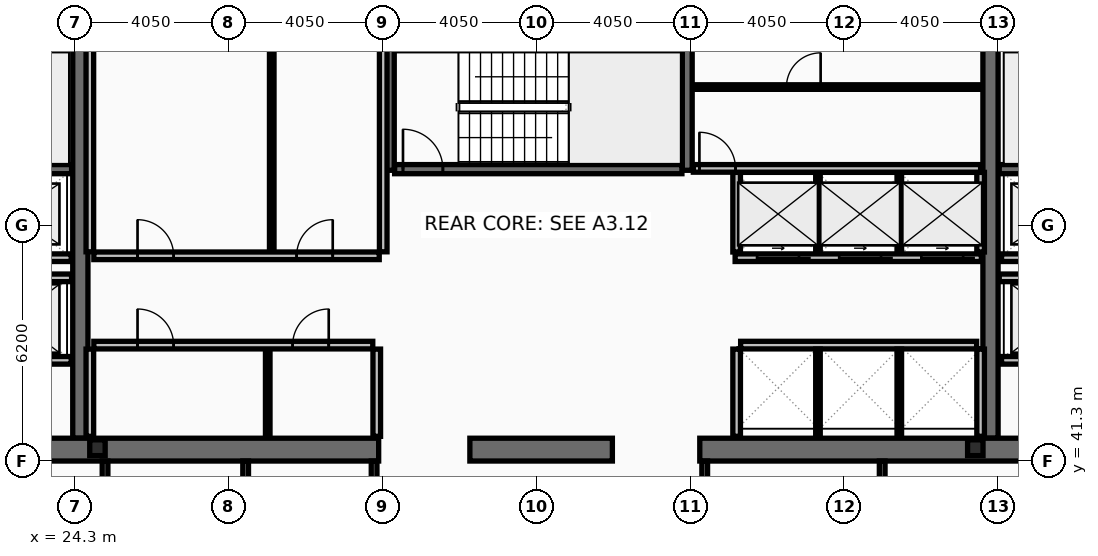
"""IFC4 building model, lengths in metres.
Left out: names, types, materials, properties, quantities, classifications, styles, units other than length and angle.
Written with IfcOpenShell. Run it as: python <this file> out.ifc"""

import sys

from ifc_helpers import new_model, si_unit, direction, frame, frame_2d, origin, origin_2d, place, context, subcontext, project, spatial, rectangle, i_section, extrude, element, fill, save


model = new_model("IFC4")
c1 = context("Model", 3, precision=1e-05, world=origin(), true_north=direction((0.0, 1.0)))
c2 = subcontext(c1, "Body", "Model", "MODEL_VIEW")
j1 = project(units=[si_unit("LENGTHUNIT", "METRE"), si_unit("PLANEANGLEUNIT", "RADIAN")], contexts=[c1])
p1 = place(None, origin())
s1 = spatial("IfcSite", under=j1, at=p1, CompositionType="ELEMENT")
p2 = place(p1, origin())
s2 = spatial("IfcBuilding", under=s1, at=p2, CompositionType="ELEMENT")
p3 = place(p2, frame((0.0, 0.0, 235.4)))
s3 = spatial("IfcBuildingStorey", under=s2, at=p3, CompositionType="ELEMENT", Elevation=235.4)
for number, where, z_axis, x_axis in (
    (1, (24.45, 41.9, 0.0), (0.0, 0.0, 1.0), (0.0, 1.0, 0.0)),
    (2, (48.4, 41.9, 0.0), (0.0, 0.0, 1.0), (0.0, 1.0, 0.0)),
):
    element("IfcWall", number, at=place(p3, frame(where, z_axis=z_axis, x_axis=x_axis)), inside=s3, PredefinedType="SHEAR", context=c2, shape_type="SweptSolid", body=[
        extrude(rectangle(XDim=11.2, YDim=0.4, at=frame_2d((5.6, 0.0))), origin(), (0.0, 0.0, 1.0), 3.44),
    ])
p4 = place(p3, frame((32.3, 41.6, 0.0), z_axis=(0.0, 0.0, 1.0), x_axis=(-1.0, 0.0, 0.0)))
e3 = element("IfcWall", 3, at=p4, inside=s3, PredefinedType="SHEAR", context=c2, shape_type="SweptSolid", body=[
    extrude(rectangle(XDim=11.45, YDim=0.6, at=frame_2d((5.725, 0.0))), origin(), (0.0, 0.0, 1.0), 3.44),
])
p5 = place(p3, frame((38.45, 41.6, 0.0), z_axis=(0.0, 0.0, 1.0), x_axis=(-1.0, 0.0, 0.0)))
e4 = element("IfcWall", 4, at=p5, inside=s3, PredefinedType="SHEAR", context=c2, shape_type="SweptSolid", body=[
    extrude(rectangle(XDim=3.75, YDim=0.6, at=frame_2d((1.875, 0.0))), origin(), (0.0, 0.0, 1.0), 3.44),
])
p6 = place(p3, frame((52.05, 41.6, 0.0), z_axis=(0.0, 0.0, 1.0), x_axis=(-1.0, 0.0, 0.0)))
e5 = element("IfcWall", 5, at=p6, inside=s3, PredefinedType="SHEAR", context=c2, shape_type="SweptSolid", body=[
    extrude(rectangle(XDim=11.3, YDim=0.6, at=frame_2d((5.65, 0.0))), origin(), (0.0, 0.0, 1.0), 3.44),
])
for number, where, z_axis, x_axis in (
    (6, (32.58, 48.95, 0.0), (0.0, 0.0, 1.0), (0.0, 1.0, 0.0)),
    (7, (40.42, 48.95, 0.0), (0.0, 0.0, 1.0), (0.0, 1.0, 0.0)),
):
    element("IfcWall", number, at=place(p3, frame(where, z_axis=z_axis, x_axis=x_axis)), inside=s3, PredefinedType="SHEAR", context=c2, shape_type="SweptSolid", body=[
        extrude(rectangle(XDim=4.15, YDim=0.26, at=frame_2d((2.075, 0.0))), origin(), (0.0, 0.0, 1.0), 3.44),
    ])
p7 = place(p3, frame((16.8, 48.98, 0.0), z_axis=(0.0, 0.0, 1.0), x_axis=(1.0, 0.0, 0.0)))
e8 = element("IfcWall", 8, at=p7, inside=s3, PredefinedType="SHEAR", context=c2, shape_type="SweptSolid", body=[
    extrude(rectangle(XDim=7.42, YDim=0.24, at=frame_2d((3.71, 0.0))), origin(), (0.0, 0.0, 1.0), 3.44),
])
p8 = place(p7, frame((0.22, 0.0, 0.0)))
e9 = element("IfcOpeningElement", 9, at=p8, cuts=e8, PredefinedType="OPENING", context=c2, shape_type="SweptSolid", body=[
    extrude(rectangle(XDim=1.05, YDim=2.15, at=frame_2d((0.525, 1.075))), frame((0.0, 0.13, 0.0), z_axis=(0.0, -1.0, 0.0), x_axis=(1.0, 0.0, 0.0)), (0.0, 0.0, 1.0), 0.26),
])
p9 = place(p3, frame((48.63, 48.98, 0.0), z_axis=(0.0, 0.0, 1.0), x_axis=(1.0, 0.0, 0.0)))
e10 = element("IfcWall", 10, at=p9, inside=s3, PredefinedType="SHEAR", context=c2, shape_type="SweptSolid", body=[
    extrude(rectangle(XDim=7.47, YDim=0.24, at=frame_2d((3.735, 0.0))), origin(), (0.0, 0.0, 1.0), 3.44),
])
p10 = place(p9, frame((6.2, 0.0, 0.0)))
e11 = element("IfcOpeningElement", 11, at=p10, cuts=e10, PredefinedType="OPENING", context=c2, shape_type="SweptSolid", body=[
    extrude(rectangle(XDim=1.05, YDim=2.15, at=frame_2d((0.525, 1.075))), frame((0.0, 0.13, 0.0), z_axis=(0.0, -1.0, 0.0), x_axis=(1.0, 0.0, 0.0)), (0.0, 0.0, 1.0), 0.26),
])
p11 = place(p3, frame((32.72, 48.98, 0.0), z_axis=(0.0, 0.0, 1.0), x_axis=(1.0, 0.0, 0.0)))
e12 = element("IfcWall", 12, at=p11, inside=s3, PredefinedType="SHEAR", context=c2, shape_type="SweptSolid", body=[
    extrude(rectangle(XDim=7.56, YDim=0.24, at=frame_2d((3.78, 0.0))), origin(), (0.0, 0.0, 1.0), 3.44),
])
p12 = place(p11, frame((0.22, 0.0, 0.0)))
e13 = element("IfcOpeningElement", 13, at=p12, cuts=e12, PredefinedType="OPENING", context=c2, shape_type="SweptSolid", body=[
    extrude(rectangle(XDim=1.05, YDim=2.15, at=frame_2d((0.525, 1.075))), frame((0.0, 0.13, 0.0), z_axis=(0.0, -1.0, 0.0), x_axis=(1.0, 0.0, 0.0)), (0.0, 0.0, 1.0), 0.26),
])
for number, where, z_axis, x_axis in (
    (14, (24.9, 41.65, 0.0), (0.0, 0.0, 1.0), (1.0, 0.0, 0.0)),
    (15, (48.0, 41.65, 0.0), (0.0, 0.0, 1.0), (1.0, 0.0, 0.0)),
):
    element("IfcColumn", number, at=place(p3, frame(where, z_axis=z_axis, x_axis=x_axis)), inside=s3, PredefinedType="COLUMN", context=c2, shape_type="SweptSolid", body=[
        extrude(i_section(OverallWidth=0.406, OverallDepth=0.416, WebThickness=0.03, FlangeThickness=0.048, at=origin_2d()), origin(), (0.0, 0.0, 1.0), 3.6),
    ])
p13 = place(p3, frame((51.61, 43.95, 0.0), z_axis=(0.0, 0.0, 1.0), x_axis=(-1.0, 0.0, 0.0)))
e16 = element("IfcWall", 16, at=p13, inside=s3, PredefinedType="PARTITIONING", context=c2, shape_type="SweptSolid", body=[
    extrude(rectangle(XDim=2.92, YDim=0.2, at=frame_2d((1.46, 0.0))), origin(), (0.0, 0.0, 1.0), 3.44),
])
p14 = place(p13, frame((0.81, 0.0, 0.0)))
e17 = element("IfcOpeningElement", 17, at=p14, cuts=e16, PredefinedType="OPENING", context=c2, shape_type="SweptSolid", body=[
    extrude(rectangle(XDim=1.3, YDim=2.18, at=frame_2d((0.65, 1.09))), frame((0.0, 0.11, 0.0), z_axis=(0.0, -1.0, 0.0), x_axis=(1.0, 0.0, 0.0)), (0.0, 0.0, 1.0), 0.22),
])
p15 = place(p3, frame((24.21, 43.95, 0.0), z_axis=(0.0, 0.0, 1.0), x_axis=(-1.0, 0.0, 0.0)))
e18 = element("IfcWall", 18, at=p15, inside=s3, PredefinedType="PARTITIONING", context=c2, shape_type="SweptSolid", body=[
    extrude(rectangle(XDim=2.97, YDim=0.2, at=frame_2d((1.485, 0.0))), origin(), (0.0, 0.0, 1.0), 3.44),
])
p16 = place(p15, frame((0.86, 0.0, 0.0)))
e19 = element("IfcOpeningElement", 19, at=p16, cuts=e18, PredefinedType="OPENING", context=c2, shape_type="SweptSolid", body=[
    extrude(rectangle(XDim=1.3, YDim=2.18, at=frame_2d((0.65, 1.09))), frame((0.0, 0.11, 0.0), z_axis=(0.0, -1.0, 0.0), x_axis=(1.0, 0.0, 0.0)), (0.0, 0.0, 1.0), 0.22),
])
p17 = place(p3, frame((51.61, 46.65, 0.0), z_axis=(0.0, 0.0, 1.0), x_axis=(-1.0, 0.0, 0.0)))
e20 = element("IfcWall", 20, at=p17, inside=s3, PredefinedType="PARTITIONING", context=c2, shape_type="SweptSolid", body=[
    extrude(rectangle(XDim=2.92, YDim=0.2, at=frame_2d((1.46, 0.0))), origin(), (0.0, 0.0, 1.0), 3.44),
])
p18 = place(p17, frame((0.86, 0.0, 0.0)))
e21 = element("IfcOpeningElement", 21, at=p18, cuts=e20, PredefinedType="OPENING", context=c2, shape_type="SweptSolid", body=[
    extrude(rectangle(XDim=1.2, YDim=2.18, at=frame_2d((0.6, 1.09))), frame((0.0, 0.11, 0.0), z_axis=(0.0, -1.0, 0.0), x_axis=(1.0, 0.0, 0.0)), (0.0, 0.0, 1.0), 0.22),
])
p19 = place(p3, frame((24.21, 46.65, 0.0), z_axis=(0.0, 0.0, 1.0), x_axis=(-1.0, 0.0, 0.0)))
e22 = element("IfcWall", 22, at=p19, inside=s3, PredefinedType="PARTITIONING", context=c2, shape_type="SweptSolid", body=[
    extrude(rectangle(XDim=2.97, YDim=0.2, at=frame_2d((1.485, 0.0))), origin(), (0.0, 0.0, 1.0), 3.44),
])
p20 = place(p19, frame((0.91, 0.0, 0.0)))
e23 = element("IfcOpeningElement", 23, at=p20, cuts=e22, PredefinedType="OPENING", context=c2, shape_type="SweptSolid", body=[
    extrude(rectangle(XDim=1.2, YDim=2.18, at=frame_2d((0.6, 1.09))), frame((0.0, 0.11, 0.0), z_axis=(0.0, -1.0, 0.0), x_axis=(1.0, 0.0, 0.0)), (0.0, 0.0, 1.0), 0.22),
])
p21 = place(p3, frame((48.16, 46.65, 0.0), z_axis=(0.0, 0.0, 1.0), x_axis=(-1.0, 0.0, 0.0)))
e24 = element("IfcWall", 24, at=p21, inside=s3, PredefinedType="PARTITIONING", context=c2, shape_type="SweptSolid", body=[
    extrude(rectangle(XDim=6.48, YDim=0.2, at=frame_2d((3.24, 0.0))), origin(), (0.0, 0.0, 1.0), 3.44),
])
p22 = place(p21, frame((4.8, 0.0, 0.0)))
e25 = element("IfcOpeningElement", 25, at=p22, cuts=e24, PredefinedType="OPENING", context=c2, shape_type="SweptSolid", body=[
    extrude(rectangle(XDim=1.1, YDim=2.18, at=frame_2d((0.55, 1.09))), frame((0.0, 0.11, 0.0), z_axis=(0.0, -1.0, 0.0), x_axis=(1.0, 0.0, 0.0)), (0.0, 0.0, 1.0), 0.22),
])
p23 = place(p21, frame((2.64, 0.0, 0.0)))
e26 = element("IfcOpeningElement", 26, at=p23, cuts=e24, PredefinedType="OPENING", context=c2, shape_type="SweptSolid", body=[
    extrude(rectangle(XDim=1.1, YDim=2.18, at=frame_2d((0.55, 1.09))), frame((0.0, 0.11, 0.0), z_axis=(0.0, -1.0, 0.0), x_axis=(1.0, 0.0, 0.0)), (0.0, 0.0, 1.0), 0.22),
])
p24 = place(p21, frame((0.48, 0.0, 0.0)))
e27 = element("IfcOpeningElement", 27, at=p24, cuts=e24, PredefinedType="OPENING", context=c2, shape_type="SweptSolid", body=[
    extrude(rectangle(XDim=1.1, YDim=2.18, at=frame_2d((0.55, 1.09))), frame((0.0, 0.11, 0.0), z_axis=(0.0, -1.0, 0.0), x_axis=(1.0, 0.0, 0.0)), (0.0, 0.0, 1.0), 0.22),
])
p25 = place(p3, frame((21.2, 46.12, 0.0), z_axis=(0.0, 0.0, 1.0), x_axis=(1.0, 0.0, 0.0)))
e28 = element("IfcWall", 28, at=p25, inside=s3, PredefinedType="PARTITIONING", context=c2, shape_type="SweptSolid", body=[
    extrude(rectangle(XDim=3.02, YDim=0.2, at=frame_2d((1.51, 0.0))), origin(), (0.0, 0.0, 1.0), 3.44),
])
p26 = place(p3, frame((48.63, 46.12, 0.0), z_axis=(0.0, 0.0, 1.0), x_axis=(1.0, 0.0, 0.0)))
e29 = element("IfcWall", 29, at=p26, inside=s3, PredefinedType="PARTITIONING", context=c2, shape_type="SweptSolid", body=[
    extrude(rectangle(XDim=3.07, YDim=0.2, at=frame_2d((1.535, 0.0))), origin(), (0.0, 0.0, 1.0), 3.44),
])
for number, where, z_axis, x_axis in (
    (30, (24.7, 46.805, 0.0), (0.0, 0.0, 1.0), (0.0, 1.0, 0.0)),
    (31, (32.42, 46.805, 0.0), (0.0, 0.0, 1.0), (0.0, 1.0, 0.0)),
):
    element("IfcWall", number, at=place(p3, frame(where, z_axis=z_axis, x_axis=x_axis)), inside=s3, PredefinedType="PARTITIONING", context=c2, shape_type="SweptSolid", body=[
        extrude(rectangle(XDim=5.99, YDim=0.2, at=frame_2d((2.995, 0.0))), origin(), (0.0, 0.0, 1.0), 3.44),
    ])
p27 = place(p3, frame((29.486, 46.805, 0.0), z_axis=(0.0, 0.0, 1.0), x_axis=(0.0, 1.0, 0.0)))
e32 = element("IfcWall", 32, at=p27, inside=s3, PredefinedType="PARTITIONING", context=c2, shape_type="SweptSolid", body=[
    extrude(rectangle(XDim=5.99, YDim=0.12, at=frame_2d((2.995, 0.0))), origin(), (0.0, 0.0, 1.0), 3.44),
])
p28 = place(p3, frame((24.805, 46.7, 0.0), z_axis=(0.0, 0.0, 1.0), x_axis=(1.0, 0.0, 0.0)))
e33 = element("IfcWall", 33, at=p28, inside=s3, PredefinedType="PARTITIONING", context=c2, shape_type="SweptSolid", body=[
    extrude(rectangle(XDim=7.51, YDim=0.2, at=frame_2d((3.755, 0.0))), origin(), (0.0, 0.0, 1.0), 3.44),
])
p29 = place(p28, frame((1.15, 0.0, 0.0)))
e34 = element("IfcOpeningElement", 34, at=p29, cuts=e33, PredefinedType="OPENING", context=c2, shape_type="SweptSolid", body=[
    extrude(rectangle(XDim=0.95, YDim=2.1, at=frame_2d((0.475, 1.05))), frame((0.0, 0.11, 0.0), z_axis=(0.0, -1.0, 0.0), x_axis=(1.0, 0.0, 0.0)), (0.0, 0.0, 1.0), 0.22),
])
p30 = place(p28, frame((5.336, 0.0, 0.0)))
e35 = element("IfcOpeningElement", 35, at=p30, cuts=e33, PredefinedType="OPENING", context=c2, shape_type="SweptSolid", body=[
    extrude(rectangle(XDim=0.95, YDim=2.1, at=frame_2d((0.475, 1.05))), frame((0.0, 0.11, 0.0), z_axis=(0.0, -1.0, 0.0), x_axis=(1.0, 0.0, 0.0)), (0.0, 0.0, 1.0), 0.22),
])
for number, where, z_axis, x_axis in (
    (36, (24.7, 41.95, 0.0), (0.0, 0.0, 1.0), (0.0, 1.0, 0.0)),
    (37, (32.25, 41.95, 0.0), (0.0, 0.0, 1.0), (0.0, 1.0, 0.0)),
):
    element("IfcWall", number, at=place(p3, frame(where, z_axis=z_axis, x_axis=x_axis)), inside=s3, PredefinedType="PARTITIONING", context=c2, shape_type="SweptSolid", body=[
        extrude(rectangle(XDim=2.295, YDim=0.2, at=frame_2d((1.147, 0.0))), origin(), (0.0, 0.0, 1.0), 3.44),
    ])
p31 = place(p3, frame((29.381, 41.95, 0.0), z_axis=(0.0, 0.0, 1.0), x_axis=(0.0, 1.0, 0.0)))
e38 = element("IfcWall", 38, at=p31, inside=s3, PredefinedType="PARTITIONING", context=c2, shape_type="SweptSolid", body=[
    extrude(rectangle(XDim=2.295, YDim=0.12, at=frame_2d((1.147, 0.0))), origin(), (0.0, 0.0, 1.0), 3.44),
])
p32 = place(p3, frame((24.805, 44.35, 0.0), z_axis=(0.0, 0.0, 1.0), x_axis=(1.0, 0.0, 0.0)))
e39 = element("IfcWall", 39, at=p32, inside=s3, PredefinedType="PARTITIONING", context=c2, shape_type="SweptSolid", body=[
    extrude(rectangle(XDim=7.34, YDim=0.2, at=frame_2d((3.67, 0.0))), origin(), (0.0, 0.0, 1.0), 3.44),
])
p33 = place(p32, frame((1.15, 0.0, 0.0)))
e40 = element("IfcOpeningElement", 40, at=p33, cuts=e39, PredefinedType="OPENING", context=c2, shape_type="SweptSolid", body=[
    extrude(rectangle(XDim=0.95, YDim=2.1, at=frame_2d((0.475, 1.05))), frame((0.0, 0.11, 0.0), z_axis=(0.0, -1.0, 0.0), x_axis=(1.0, 0.0, 0.0)), (0.0, 0.0, 1.0), 0.22),
])
p34 = place(p32, frame((5.231, 0.0, 0.0)))
e41 = element("IfcOpeningElement", 41, at=p34, cuts=e39, PredefinedType="OPENING", context=c2, shape_type="SweptSolid", body=[
    extrude(rectangle(XDim=0.95, YDim=2.1, at=frame_2d((0.475, 1.05))), frame((0.0, 0.11, 0.0), z_axis=(0.0, -1.0, 0.0), x_axis=(1.0, 0.0, 0.0)), (0.0, 0.0, 1.0), 0.22),
])
for number, where, z_axis, x_axis in (
    (42, (41.72, 46.8, 0.0), (0.0, 0.0, 1.0), (0.0, 1.0, 0.0)),
    (43, (48.14, 46.8, 0.0), (0.0, 0.0, 1.0), (0.0, 1.0, 0.0)),
):
    element("IfcWall", number, at=place(p3, frame(where, z_axis=z_axis, x_axis=x_axis)), inside=s3, PredefinedType="PARTITIONING", context=c2, shape_type="SweptSolid", body=[
        extrude(rectangle(XDim=2.095, YDim=0.2, at=frame_2d((1.047, 0.0))), origin(), (0.0, 0.0, 1.0), 3.44),
    ])
for number, where, z_axis, x_axis in (
    (44, (43.86, 46.8, 0.0), (0.0, 0.0, 1.0), (0.0, 1.0, 0.0)),
    (45, (46.0, 46.8, 0.0), (0.0, 0.0, 1.0), (0.0, 1.0, 0.0)),
):
    element("IfcWall", number, at=place(p3, frame(where, z_axis=z_axis, x_axis=x_axis)), inside=s3, PredefinedType="PARTITIONING", context=c2, shape_type="SweptSolid", body=[
        extrude(rectangle(XDim=2.095, YDim=0.12, at=frame_2d((1.047, 0.0))), origin(), (0.0, 0.0, 1.0), 3.44),
    ])
p35 = place(p3, frame((41.825, 44.35, 0.0), z_axis=(0.0, 0.0, 1.0), x_axis=(1.0, 0.0, 0.0)))
e46 = element("IfcWall", 46, at=p35, inside=s3, PredefinedType="PARTITIONING", context=c2, shape_type="SweptSolid", body=[
    extrude(rectangle(XDim=6.21, YDim=0.2, at=frame_2d((3.105, 0.0))), origin(), (0.0, 0.0, 1.0), 3.44),
])
for number, where, z_axis, x_axis in (
    (47, (41.72, 41.95, 0.0), (0.0, 0.0, 1.0), (0.0, 1.0, 0.0)),
    (48, (48.14, 41.95, 0.0), (0.0, 0.0, 1.0), (0.0, 1.0, 0.0)),
):
    element("IfcWall", number, at=place(p3, frame(where, z_axis=z_axis, x_axis=x_axis)), inside=s3, PredefinedType="PARTITIONING", context=c2, shape_type="SweptSolid", body=[
        extrude(rectangle(XDim=2.295, YDim=0.2, at=frame_2d((1.147, 0.0))), origin(), (0.0, 0.0, 1.0), 3.44),
    ])
for number, where, z_axis, x_axis in (
    (49, (43.86, 41.95, 0.0), (0.0, 0.0, 1.0), (0.0, 1.0, 0.0)),
    (50, (46.0, 41.95, 0.0), (0.0, 0.0, 1.0), (0.0, 1.0, 0.0)),
):
    element("IfcWall", number, at=place(p3, frame(where, z_axis=z_axis, x_axis=x_axis)), inside=s3, PredefinedType="PARTITIONING", context=c2, shape_type="SweptSolid", body=[
        extrude(rectangle(XDim=2.295, YDim=0.12, at=frame_2d((1.147, 0.0))), origin(), (0.0, 0.0, 1.0), 3.44),
    ])
p36 = place(p3, frame((40.58, 49.0, 0.0), z_axis=(0.0, 0.0, 1.0), x_axis=(1.0, 0.0, 0.0)))
e51 = element("IfcWall", 51, at=p36, inside=s3, PredefinedType="PARTITIONING", context=c2, shape_type="SweptSolid", body=[
    extrude(rectangle(XDim=7.56, YDim=0.2, at=frame_2d((3.78, 0.0))), origin(), (0.0, 0.0, 1.0), 3.44),
])
p37 = place(p36, frame((0.16, 0.0, 0.0)))
e52 = element("IfcOpeningElement", 52, at=p37, cuts=e51, PredefinedType="OPENING", context=c2, shape_type="SweptSolid", body=[
    extrude(rectangle(XDim=0.95, YDim=2.1, at=frame_2d((0.475, 1.05))), frame((0.0, 0.11, 0.0), z_axis=(0.0, -1.0, 0.0), x_axis=(1.0, 0.0, 0.0)), (0.0, 0.0, 1.0), 0.22),
])
p38 = place(p3, frame((40.63, 51.14, 0.0), z_axis=(0.0, 0.0, 1.0), x_axis=(1.0, 0.0, 0.0)))
e53 = element("IfcWall", 53, at=p38, inside=s3, PredefinedType="PARTITIONING", context=c2, shape_type="SweptSolid", body=[
    extrude(rectangle(XDim=7.46, YDim=0.12, at=frame_2d((3.73, 0.0))), origin(), (0.0, 0.0, 1.0), 3.44),
])
p39 = place(p38, frame((2.4, 0.0, 0.0)))
e54 = element("IfcOpeningElement", 54, at=p39, cuts=e53, PredefinedType="OPENING", context=c2, shape_type="SweptSolid", body=[
    extrude(rectangle(XDim=0.9, YDim=2.05, at=frame_2d((0.45, 1.025))), frame((0.0, 0.07, 0.0), z_axis=(0.0, -1.0, 0.0), x_axis=(1.0, 0.0, 0.0)), (0.0, 0.0, 1.0), 0.14),
])
p40 = place(p3, frame((25.1, 38.28, 0.0), z_axis=(0.0, 0.0, 1.0), x_axis=(0.0, 1.0, 0.0)))
e55 = element("IfcWall", 55, at=p40, inside=s3, PredefinedType="PARTITIONING", context=c2, shape_type="SweptSolid", body=[
    extrude(rectangle(XDim=3.02, YDim=0.15, at=frame_2d((1.51, 0.0))), origin(), (0.0, 0.0, 1.0), 2.78),
])
for number, where, z_axis, x_axis in (
    (56, (28.8, 38.28, 0.0), (0.0, 0.0, 1.0), (0.0, 1.0, 0.0)),
    (57, (32.18, 38.28, 0.0), (0.0, 0.0, 1.0), (0.0, 1.0, 0.0)),
    (58, (40.88, 38.28, 0.0), (0.0, 0.0, 1.0), (0.0, 1.0, 0.0)),
    (59, (45.55, 38.28, 0.0), (0.0, 0.0, 1.0), (0.0, 1.0, 0.0)),
):
    element("IfcWall", number, at=place(p3, frame(where, z_axis=z_axis, x_axis=x_axis)), inside=s3, PredefinedType="PARTITIONING", context=c2, shape_type="SweptSolid", body=[
        extrude(rectangle(XDim=3.02, YDim=0.15, at=frame_2d((1.51, 0.0))), origin(), (0.0, 0.0, 1.0), 3.44),
    ])
p41 = place(p12, origin())
e60 = element("IfcDoor", 60, at=p41, inside=s3, OperationType="SINGLE_SWING_LEFT", PredefinedType="DOOR", context=c2, shape_type="SweptSolid", body=[
    extrude(rectangle(XDim=1.05, YDim=2.15, at=frame_2d((0.525, 1.075))), frame((0.0, 0.025, 0.0), z_axis=(0.0, -1.0, 0.0), x_axis=(1.0, 0.0, 0.0)), (0.0, 0.0, 1.0), 0.05),
])
fill(e13, e60)
p42 = place(p22, origin())
e61 = element("IfcDoor", 61, at=p42, inside=s3, OperationType="SLIDING_TO_LEFT", PredefinedType="DOOR", context=c2, shape_type="SweptSolid", body=[
    extrude(rectangle(XDim=1.1, YDim=2.18, at=frame_2d((0.55, 1.09))), frame((0.0, 0.025, 0.0), z_axis=(0.0, -1.0, 0.0), x_axis=(1.0, 0.0, 0.0)), (0.0, 0.0, 1.0), 0.05),
])
fill(e25, e61)
p43 = place(p23, origin())
e62 = element("IfcDoor", 62, at=p43, inside=s3, OperationType="SLIDING_TO_LEFT", PredefinedType="DOOR", context=c2, shape_type="SweptSolid", body=[
    extrude(rectangle(XDim=1.1, YDim=2.18, at=frame_2d((0.55, 1.09))), frame((0.0, 0.025, 0.0), z_axis=(0.0, -1.0, 0.0), x_axis=(1.0, 0.0, 0.0)), (0.0, 0.0, 1.0), 0.05),
])
fill(e26, e62)
p44 = place(p24, origin())
e63 = element("IfcDoor", 63, at=p44, inside=s3, OperationType="SLIDING_TO_LEFT", PredefinedType="DOOR", context=c2, shape_type="SweptSolid", body=[
    extrude(rectangle(XDim=1.1, YDim=2.18, at=frame_2d((0.55, 1.09))), frame((0.0, 0.025, 0.0), z_axis=(0.0, -1.0, 0.0), x_axis=(1.0, 0.0, 0.0)), (0.0, 0.0, 1.0), 0.05),
])
fill(e27, e63)
p45 = place(p29, origin())
e64 = element("IfcDoor", 64, at=p45, inside=s3, OperationType="SINGLE_SWING_LEFT", PredefinedType="DOOR", context=c2, shape_type="SweptSolid", body=[
    extrude(rectangle(XDim=0.95, YDim=2.1, at=frame_2d((0.475, 1.05))), frame((0.0, 0.025, 0.0), z_axis=(0.0, -1.0, 0.0), x_axis=(1.0, 0.0, 0.0)), (0.0, 0.0, 1.0), 0.05),
])
fill(e34, e64)
p46 = place(p30, origin())
e65 = element("IfcDoor", 65, at=p46, inside=s3, OperationType="SINGLE_SWING_RIGHT", PredefinedType="DOOR", context=c2, shape_type="SweptSolid", body=[
    extrude(rectangle(XDim=0.95, YDim=2.1, at=frame_2d((0.475, 1.05))), frame((0.0, 0.025, 0.0), z_axis=(0.0, -1.0, 0.0), x_axis=(1.0, 0.0, 0.0)), (0.0, 0.0, 1.0), 0.05),
])
fill(e35, e65)
p47 = place(p33, origin())
e66 = element("IfcDoor", 66, at=p47, inside=s3, OperationType="SINGLE_SWING_LEFT", PredefinedType="DOOR", context=c2, shape_type="SweptSolid", body=[
    extrude(rectangle(XDim=0.95, YDim=2.1, at=frame_2d((0.475, 1.05))), frame((0.0, 0.025, 0.0), z_axis=(0.0, -1.0, 0.0), x_axis=(1.0, 0.0, 0.0)), (0.0, 0.0, 1.0), 0.05),
])
fill(e40, e66)
p48 = place(p34, origin())
e67 = element("IfcDoor", 67, at=p48, inside=s3, OperationType="SINGLE_SWING_RIGHT", PredefinedType="DOOR", context=c2, shape_type="SweptSolid", body=[
    extrude(rectangle(XDim=0.95, YDim=2.1, at=frame_2d((0.475, 1.05))), frame((0.0, 0.025, 0.0), z_axis=(0.0, -1.0, 0.0), x_axis=(1.0, 0.0, 0.0)), (0.0, 0.0, 1.0), 0.05),
])
fill(e41, e67)
p49 = place(p37, origin())
e68 = element("IfcDoor", 68, at=p49, inside=s3, OperationType="SINGLE_SWING_LEFT", PredefinedType="DOOR", context=c2, shape_type="SweptSolid", body=[
    extrude(rectangle(XDim=0.95, YDim=2.1, at=frame_2d((0.475, 1.05))), frame((0.0, 0.025, 0.0), z_axis=(0.0, -1.0, 0.0), x_axis=(1.0, 0.0, 0.0)), (0.0, 0.0, 1.0), 0.05),
])
fill(e52, e68)
p50 = place(p39, origin())
e69 = element("IfcDoor", 69, at=p50, inside=s3, OperationType="SINGLE_SWING_RIGHT", PredefinedType="DOOR", context=c2, shape_type="SweptSolid", body=[
    extrude(rectangle(XDim=0.9, YDim=2.05, at=frame_2d((0.45, 1.025))), frame((0.0, 0.025, 0.0), z_axis=(0.0, -1.0, 0.0), x_axis=(1.0, 0.0, 0.0)), (0.0, 0.0, 1.0), 0.05),
])
fill(e54, e69)
save(model, sys.argv[1])
